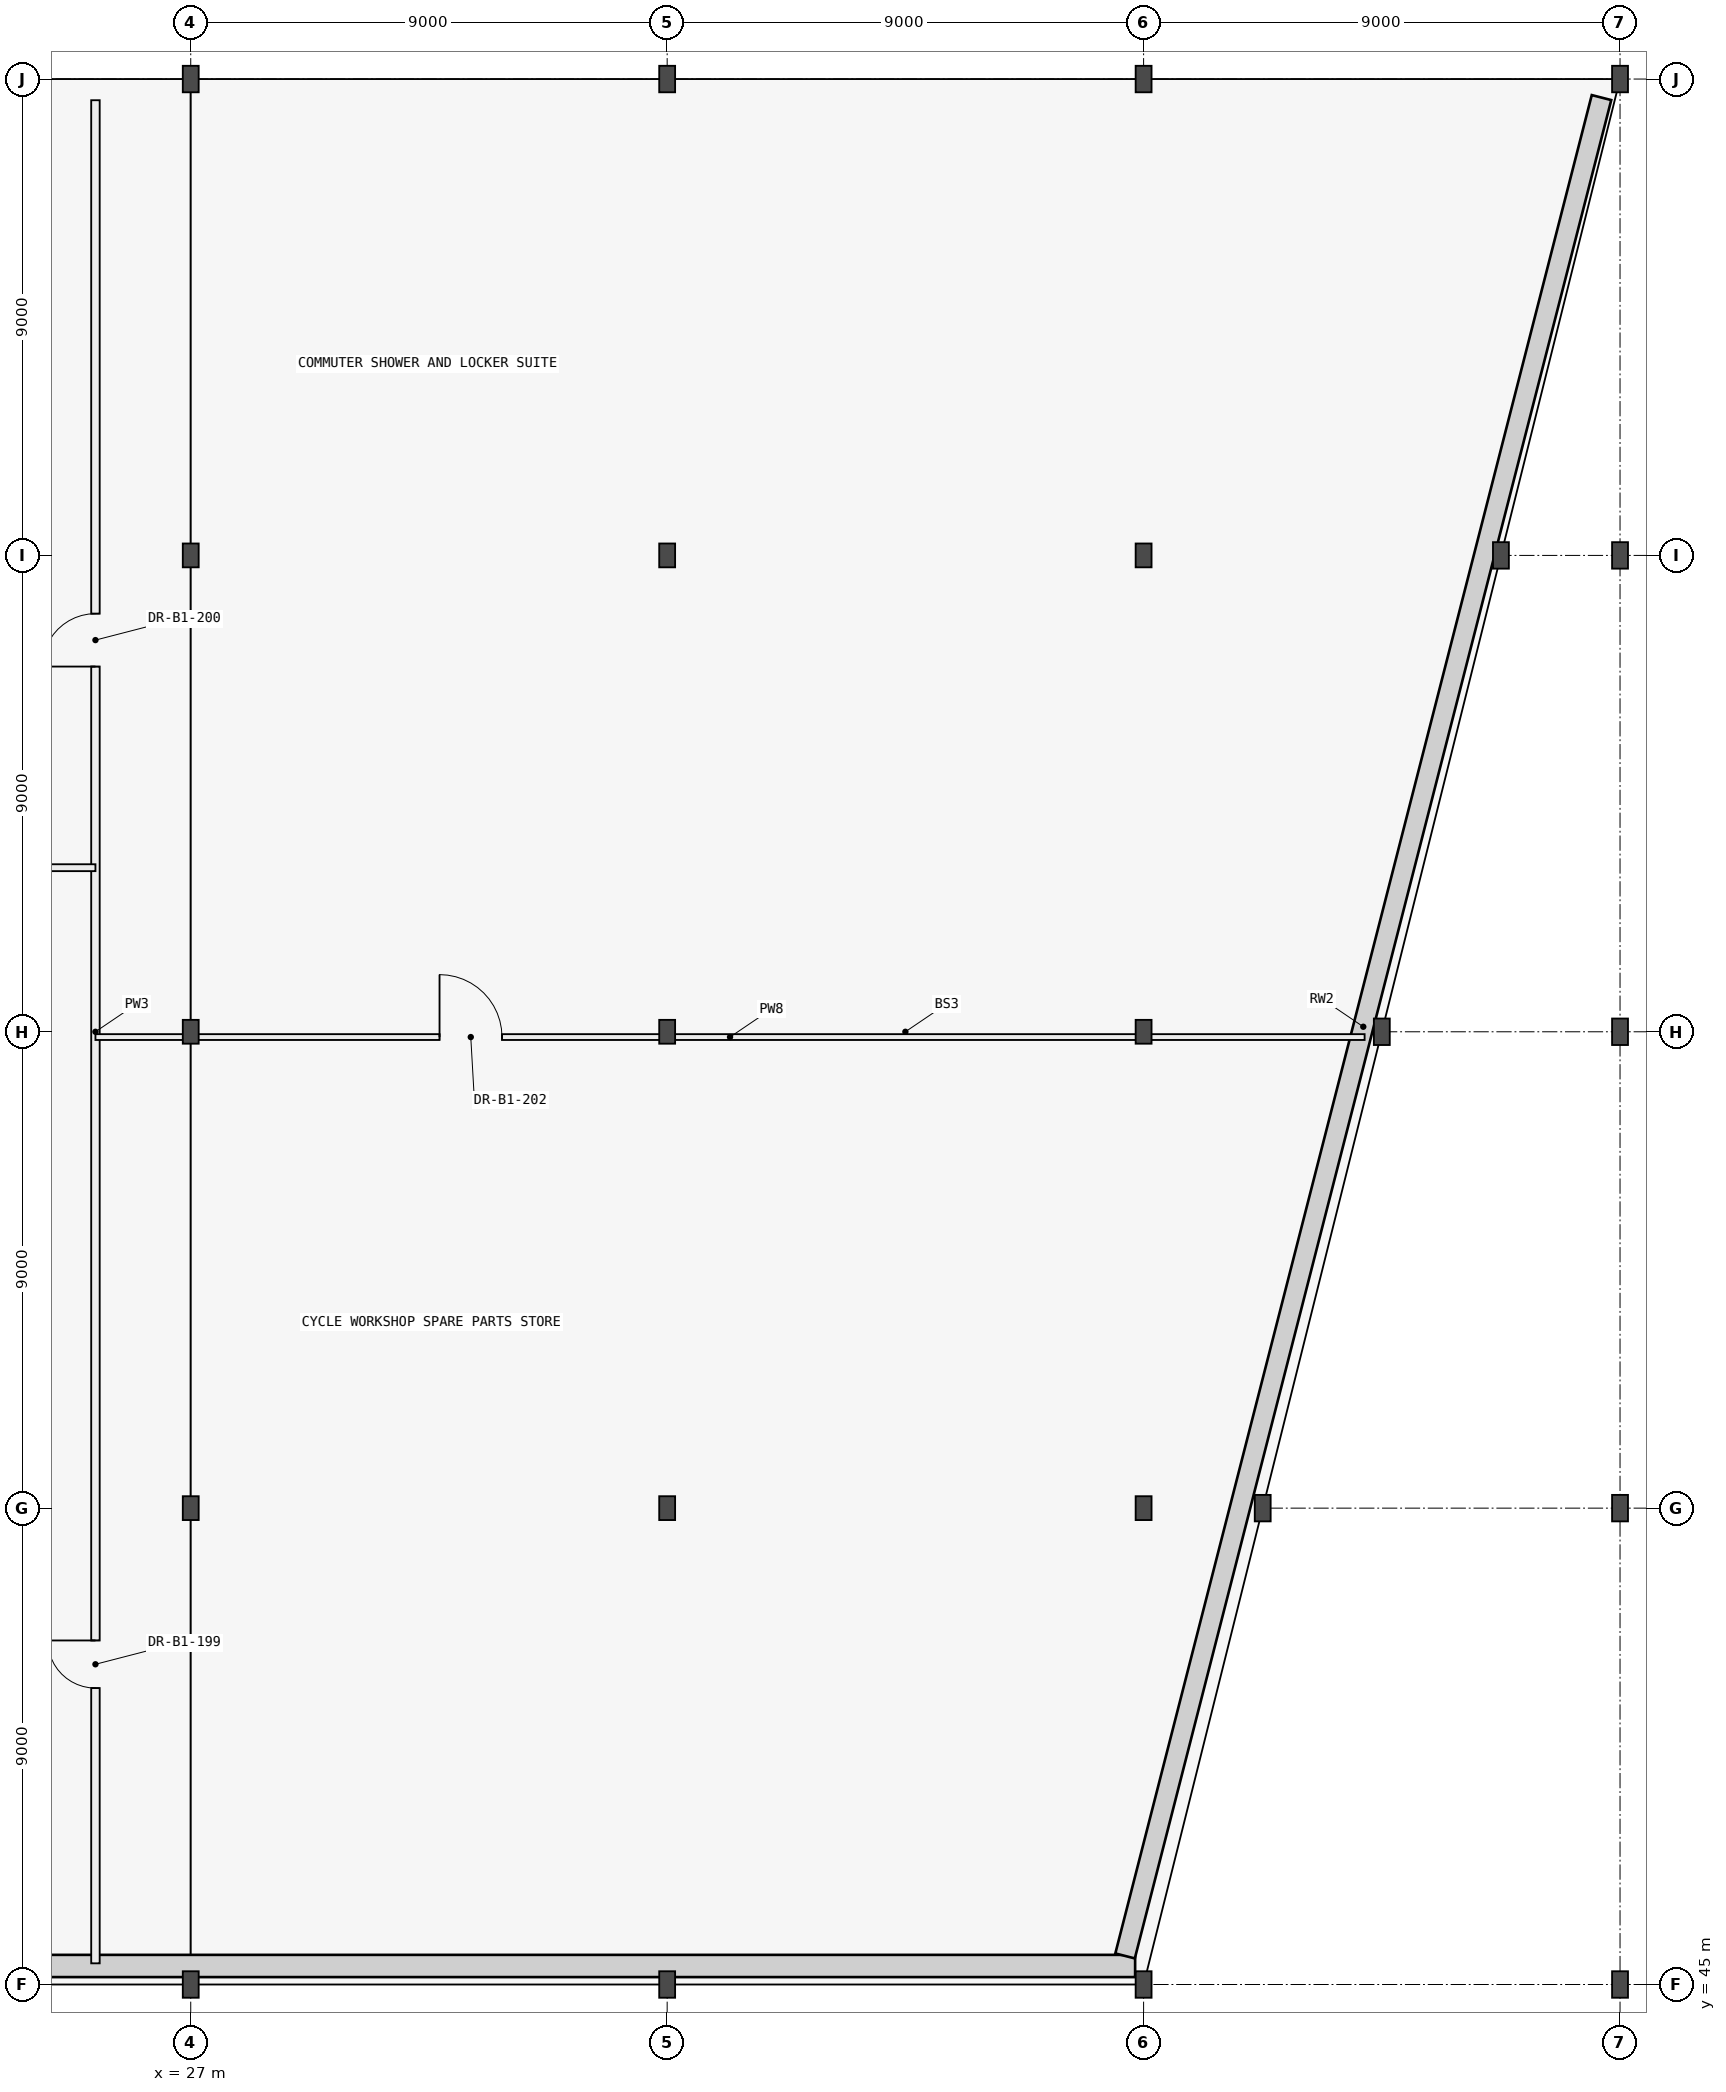
"""IFC4 building model, lengths in metres.
Left out: names, types, materials, properties, quantities, classifications, styles, units other than length and angle.
Written with IfcOpenShell. Run it as: python <this file> out.ifc"""

import sys

from ifc_helpers import new_model, si_unit, direction, frame, frame_2d, origin, origin_2d, place, context, subcontext, project, spatial, rectangle, i_section, extrude, element, fill, save


model = new_model("IFC4")
c1 = context("Model", 3, precision=1e-05, world=origin(), true_north=direction((0.0, 1.0)))
c2 = subcontext(c1, "Body", "Model", "MODEL_VIEW")
j1 = project(units=[si_unit("LENGTHUNIT", "METRE"), si_unit("PLANEANGLEUNIT", "RADIAN")], contexts=[c1])
p1 = place(None, origin())
s1 = spatial("IfcSite", under=j1, at=p1, CompositionType="ELEMENT")
p2 = place(p1, origin())
s2 = spatial("IfcBuilding", under=s1, at=p2, CompositionType="ELEMENT")
p3 = place(p2, frame((0.0, 0.0, -4.2)))
s3 = spatial("IfcBuildingStorey", under=s2, at=p3, CompositionType="ELEMENT", Elevation=-4.2)
for number, where, z_axis, x_axis in (
    (1, (27.0, 45.0, 0.0), (0.0, 0.0, 1.0), (1.0, 0.0, 0.0)),
    (2, (36.0, 45.0, 0.0), (0.0, 0.0, 1.0), (1.0, 0.0, 0.0)),
    (3, (45.0, 45.0, 0.0), (0.0, 0.0, 1.0), (1.0, 0.0, 0.0)),
):
    element("IfcColumn", number, at=place(p3, frame(where, z_axis=z_axis, x_axis=x_axis)), inside=s3, PredefinedType="COLUMN", context=c2, shape_type="SweptSolid", body=[
        extrude(i_section(OverallWidth=0.3, OverallDepth=0.5, WebThickness=0.014, FlangeThickness=0.028, FilletRadius=0.027, at=origin_2d()), origin(), (0.0, 0.0, 1.0), 4.2),
    ])
for number, where, z_axis, x_axis in (
    (4, (27.0, 54.0, 0.0), (0.0, 0.0, 1.0), (1.0, 0.0, 0.0)),
    (5, (36.0, 54.0, 0.0), (0.0, 0.0, 1.0), (1.0, 0.0, 0.0)),
    (6, (45.0, 54.0, 0.0), (0.0, 0.0, 1.0), (1.0, 0.0, 0.0)),
):
    element("IfcColumn", number, at=place(p3, frame(where, z_axis=z_axis, x_axis=x_axis)), inside=s3, PredefinedType="COLUMN", context=c2, shape_type="SweptSolid", body=[
        extrude(i_section(OverallWidth=0.3, OverallDepth=0.45, WebThickness=0.014, FlangeThickness=0.026, FilletRadius=0.027, at=origin_2d()), origin(), (0.0, 0.0, 1.0), 4.2),
    ])
p4 = place(p3, frame((47.25, 54.0, 0.0), z_axis=(0.0, 0.0, 1.0), x_axis=(1.0, 0.0, 0.0)))
e7 = element("IfcColumn", 7, at=p4, inside=s3, PredefinedType="COLUMN", context=c2, shape_type="SweptSolid", body=[
    extrude(i_section(OverallWidth=0.3, OverallDepth=0.5, WebThickness=0.014, FlangeThickness=0.028, FilletRadius=0.027, at=origin_2d()), origin(), (0.0, 0.0, 1.0), 4.2),
])
for number, where, z_axis, x_axis in (
    (8, (27.0, 63.0, 0.0), (0.0, 0.0, 1.0), (1.0, 0.0, 0.0)),
    (9, (36.0, 63.0, 0.0), (0.0, 0.0, 1.0), (1.0, 0.0, 0.0)),
    (10, (45.0, 63.0, 0.0), (0.0, 0.0, 1.0), (1.0, 0.0, 0.0)),
):
    element("IfcColumn", number, at=place(p3, frame(where, z_axis=z_axis, x_axis=x_axis)), inside=s3, PredefinedType="COLUMN", context=c2, shape_type="SweptSolid", body=[
        extrude(i_section(OverallWidth=0.3, OverallDepth=0.45, WebThickness=0.014, FlangeThickness=0.026, FilletRadius=0.027, at=origin_2d()), origin(), (0.0, 0.0, 1.0), 4.2),
    ])
p5 = place(p3, frame((49.5, 63.0, 0.0), z_axis=(0.0, 0.0, 1.0), x_axis=(1.0, 0.0, 0.0)))
e11 = element("IfcColumn", 11, at=p5, inside=s3, PredefinedType="COLUMN", context=c2, shape_type="SweptSolid", body=[
    extrude(i_section(OverallWidth=0.3, OverallDepth=0.5, WebThickness=0.014, FlangeThickness=0.028, FilletRadius=0.027, at=origin_2d()), origin(), (0.0, 0.0, 1.0), 4.2),
])
for number, where, z_axis, x_axis in (
    (12, (27.0, 72.0, 0.0), (0.0, 0.0, 1.0), (1.0, 0.0, 0.0)),
    (13, (36.0, 72.0, 0.0), (0.0, 0.0, 1.0), (1.0, 0.0, 0.0)),
    (14, (45.0, 72.0, 0.0), (0.0, 0.0, 1.0), (1.0, 0.0, 0.0)),
):
    element("IfcColumn", number, at=place(p3, frame(where, z_axis=z_axis, x_axis=x_axis)), inside=s3, PredefinedType="COLUMN", context=c2, shape_type="SweptSolid", body=[
        extrude(i_section(OverallWidth=0.3, OverallDepth=0.45, WebThickness=0.014, FlangeThickness=0.026, FilletRadius=0.027, at=origin_2d()), origin(), (0.0, 0.0, 1.0), 4.2),
    ])
for number, where, z_axis, x_axis in (
    (15, (51.75, 72.0, 0.0), (0.0, 0.0, 1.0), (1.0, 0.0, 0.0)),
    (16, (27.0, 81.0, 0.0), (0.0, 0.0, 1.0), (1.0, 0.0, 0.0)),
    (17, (36.0, 81.0, 0.0), (0.0, 0.0, 1.0), (1.0, 0.0, 0.0)),
    (18, (45.0, 81.0, 0.0), (0.0, 0.0, 1.0), (1.0, 0.0, 0.0)),
    (19, (54.0, 81.0, 0.0), (0.0, 0.0, 1.0), (1.0, 0.0, 0.0)),
    (20, (54.0, 54.0, 0.0), (0.0, 0.0, 1.0), (1.0, 0.0, 0.0)),
    (21, (54.0, 63.0, 0.0), (0.0, 0.0, 1.0), (1.0, 0.0, 0.0)),
    (22, (54.0, 45.0, 0.0), (0.0, 0.0, 1.0), (1.0, 0.0, 0.0)),
    (23, (54.0, 72.0, 0.0), (0.0, 0.0, 1.0), (1.0, 0.0, 0.0)),
):
    element("IfcColumn", number, at=place(p3, frame(where, z_axis=z_axis, x_axis=x_axis)), inside=s3, PredefinedType="COLUMN", context=c2, shape_type="SweptSolid", body=[
        extrude(i_section(OverallWidth=0.3, OverallDepth=0.5, WebThickness=0.014, FlangeThickness=0.028, FilletRadius=0.027, at=origin_2d()), origin(), (0.0, 0.0, 1.0), 4.2),
    ])
p6 = place(p3, frame((0.56, 45.35, 0.0), z_axis=(0.0, 0.0, 1.0), x_axis=(1.0, 0.0, 0.0)))
e24 = element("IfcWall", 24, at=p6, inside=s3, PredefinedType="USERDEFINED", context=c2, shape_type="SweptSolid", body=[
    extrude(rectangle(XDim=44.28, YDim=0.42, at=frame_2d((22.14, 0.0))), origin(), (0.0, 0.0, 1.0), 3.6),
])
p7 = place(p3, frame((44.65, 45.54, 0.0), z_axis=(0.0, 0.0, 1.0), x_axis=(0.248309877868, 0.968680651481, 0.0)))
e25 = element("IfcWall", 25, at=p7, inside=s3, PredefinedType="USERDEFINED", context=c2, shape_type="SweptSolid", body=[
    extrude(rectangle(XDim=36.245, YDim=0.38, at=frame_2d((18.123, 0.0))), origin(), (0.0, 0.0, 1.0), 3.6),
])
p8 = place(p3, frame((25.2, 45.4, 0.0), z_axis=(0.0, 0.0, 1.0), x_axis=(0.0, 1.0, 0.0)))
e26 = element("IfcWall", 26, at=p8, inside=s3, PredefinedType="PARTITIONING", context=c2, shape_type="SweptSolid", body=[
    extrude(rectangle(XDim=35.2, YDim=0.16, at=frame_2d((17.6, 0.0))), origin(), (0.0, 0.0, 1.0), 3.94),
])
p9 = place(p8, frame((5.2, 0.0, 0.0)))
e27 = element("IfcOpeningElement", 27, at=p9, cuts=e26, PredefinedType="OPENING", context=c2, shape_type="SweptSolid", body=[
    extrude(rectangle(XDim=0.9, YDim=2.1, at=frame_2d((0.45, 1.05))), frame((0.0, 0.09, 0.0), z_axis=(0.0, -1.0, 0.0), x_axis=(1.0, 0.0, 0.0)), (0.0, 0.0, 1.0), 0.18),
])
p10 = place(p8, frame((24.5, 0.0, 0.0)))
e28 = element("IfcOpeningElement", 28, at=p10, cuts=e26, PredefinedType="OPENING", context=c2, shape_type="SweptSolid", body=[
    extrude(rectangle(XDim=1.0, YDim=2.1, at=frame_2d((0.5, 1.05))), frame((0.0, 0.09, 0.0), z_axis=(0.0, -1.0, 0.0), x_axis=(1.0, 0.0, 0.0)), (0.0, 0.0, 1.0), 0.18),
])
p11 = place(p3, frame((0.4, 66.1, 0.0), z_axis=(0.0, 0.0, 1.0), x_axis=(1.0, 0.0, 0.0)))
e29 = element("IfcWall", 29, at=p11, inside=s3, PredefinedType="PARTITIONING", context=c2, shape_type="SweptSolid", body=[
    extrude(rectangle(XDim=24.8, YDim=0.13, at=frame_2d((12.4, 0.0))), origin(), (0.0, 0.0, 1.0), 3.94),
])
p12 = place(p11, frame((5.8, 0.0, 0.0)))
e30 = element("IfcOpeningElement", 30, at=p12, cuts=e29, PredefinedType="OPENING", context=c2, shape_type="SweptSolid", body=[
    extrude(rectangle(XDim=1.08, YDim=2.12, at=frame_2d((0.54, 1.06))), frame((0.0, 0.075, 0.0), z_axis=(0.0, -1.0, 0.0), x_axis=(1.0, 0.0, 0.0)), (0.0, 0.0, 1.0), 0.15),
])
p13 = place(p3, frame((25.2, 62.9, 0.0), z_axis=(0.0, 0.0, 1.0), x_axis=(1.0, 0.0, 0.0)))
e31 = element("IfcWall", 31, at=p13, inside=s3, PredefinedType="PARTITIONING", context=c2, shape_type="SweptSolid", body=[
    extrude(rectangle(XDim=23.975, YDim=0.11, at=frame_2d((11.988, 0.0))), origin(), (0.0, 0.0, 1.0), 3.415),
])
p14 = place(p13, frame((6.5, 0.0, 0.0)))
e32 = element("IfcOpeningElement", 32, at=p14, cuts=e31, PredefinedType="OPENING", context=c2, shape_type="SweptSolid", body=[
    extrude(rectangle(XDim=1.18, YDim=2.15, at=frame_2d((0.59, 1.075))), frame((0.0, 0.065, 0.0), z_axis=(0.0, -1.0, 0.0), x_axis=(1.0, 0.0, 0.0)), (0.0, 0.0, 1.0), 0.13),
])
p15 = place(p9, origin())
e33 = element("IfcDoor", 33, at=p15, inside=s3, OperationType="SINGLE_SWING_RIGHT", PredefinedType="DOOR", context=c2, shape_type="SweptSolid", body=[
    extrude(rectangle(XDim=0.9, YDim=2.1, at=frame_2d((0.45, 1.05))), frame((0.0, 0.025, 0.0), z_axis=(0.0, -1.0, 0.0), x_axis=(1.0, 0.0, 0.0)), (0.0, 0.0, 1.0), 0.05),
])
fill(e27, e33)
p16 = place(p10, origin())
e34 = element("IfcDoor", 34, at=p16, inside=s3, OperationType="SINGLE_SWING_LEFT", PredefinedType="DOOR", context=c2, shape_type="SweptSolid", body=[
    extrude(rectangle(XDim=1.0, YDim=2.1, at=frame_2d((0.5, 1.05))), frame((0.0, 0.025, 0.0), z_axis=(0.0, -1.0, 0.0), x_axis=(1.0, 0.0, 0.0)), (0.0, 0.0, 1.0), 0.05),
])
fill(e28, e34)
p17 = place(p14, origin())
e35 = element("IfcDoor", 35, at=p17, inside=s3, OperationType="SINGLE_SWING_LEFT", PredefinedType="DOOR", context=c2, shape_type="SweptSolid", body=[
    extrude(rectangle(XDim=1.18, YDim=2.15, at=frame_2d((0.59, 1.075))), frame((0.0, 0.025, 0.0), z_axis=(0.0, -1.0, 0.0), x_axis=(1.0, 0.0, 0.0)), (0.0, 0.0, 1.0), 0.05),
])
fill(e32, e35)
save(model, sys.argv[1])
